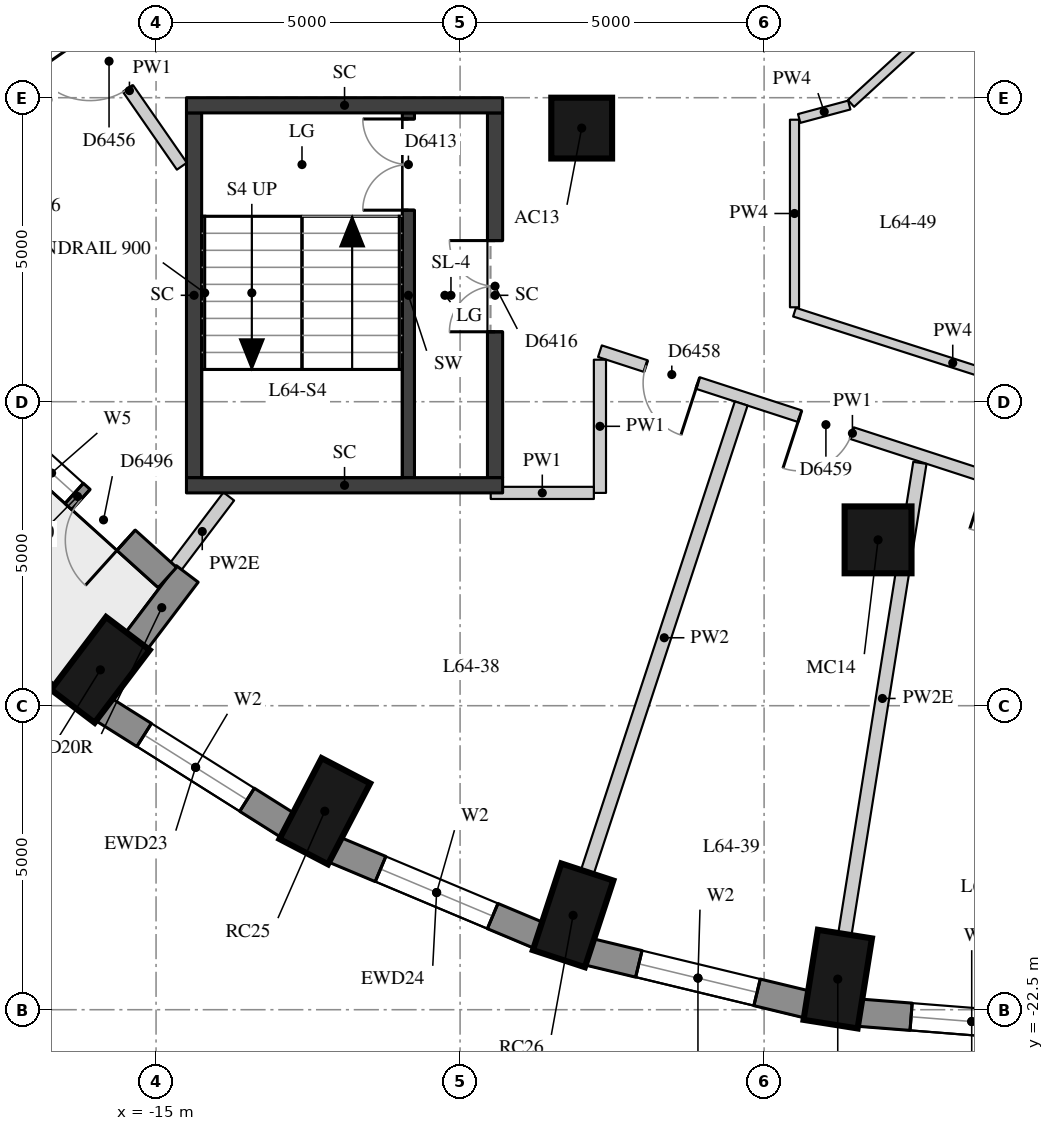
"""IFC4 building model, lengths in metres.
Left out: names, types, materials, properties, quantities, classifications, styles, units other than length and angle.
Written with IfcOpenShell. Run it as: python <this file> out.ifc"""

import sys

from ifc_helpers import new_model, si_unit, direction, frame, frame_2d, origin, origin_2d, place, context, subcontext, project, spatial, rectangle, extrude, element, fill, save


model = new_model("IFC4")
c1 = context("Model", 3, precision=1e-05, world=origin(), true_north=direction((0.0, 1.0)))
c2 = subcontext(c1, "Body", "Model", "MODEL_VIEW")
j1 = project(units=[si_unit("LENGTHUNIT", "METRE"), si_unit("PLANEANGLEUNIT", "RADIAN")], contexts=[c1])
p1 = place(None, origin())
s1 = spatial("IfcSite", under=j1, at=p1, CompositionType="ELEMENT")
p2 = place(p1, origin())
s2 = spatial("IfcBuilding", under=s1, at=p2, CompositionType="ELEMENT")
p3 = place(p2, frame((0.0, 0.0, 225.5)))
s3 = spatial("IfcBuildingStorey", under=s2, at=p3, CompositionType="ELEMENT", Elevation=225.5)
for number, where, z_axis, x_axis in (
    (1, (-15.916, -16.911, 0.0), (0.0, 0.0, 1.0), (-0.604, -0.797, 0.0)),
    (2, (-12.225, -19.235, 0.0), (0.0, 0.0, 1.0), (-0.462, -0.887, 0.0)),
    (3, (-8.141, -20.948, 0.0), (0.0, 0.0, 1.0), (-0.312, -0.95, 0.0)),
    (4, (-3.789, -21.997, 0.0), (0.0, 0.0, 1.0), (-0.157, -0.988, 0.0)),
):
    element("IfcColumn", number, at=place(p3, frame(where, z_axis=z_axis, x_axis=x_axis)), inside=s3, PredefinedType="COLUMN", context=c2, shape_type="SweptSolid", body=[
        extrude(rectangle(XDim=1.5, YDim=0.9, at=origin_2d()), origin(), (0.0, 0.0, 1.0), 3.3),
    ])
p4 = place(p3, frame((-8.0, -8.0, 0.0), z_axis=(0.0, 0.0, 1.0), x_axis=(1.0, 0.0, 0.0)))
e5 = element("IfcColumn", 5, at=p4, inside=s3, PredefinedType="COLUMN", context=c2, shape_type="SweptSolid", body=[
    extrude(rectangle(XDim=1.0, YDim=1.0, at=origin_2d()), origin(), (0.0, 0.0, 1.0), 3.3),
])
p5 = place(p3, frame((-3.126, -14.772, 0.0), z_axis=(0.0, 0.0, 1.0), x_axis=(1.0, 0.0, 0.0)))
e6 = element("IfcColumn", 6, at=p5, inside=s3, PredefinedType="COLUMN", context=c2, shape_type="SweptSolid", body=[
    extrude(rectangle(XDim=1.1, YDim=1.1, at=origin_2d()), origin(), (0.0, 0.0, 1.0), 3.3),
])
p6 = place(p3, frame((-15.867, -17.559, 0.0), z_axis=(0.0, 0.0, 1.0), x_axis=(0.84616917791, -0.532914366813, 0.0)))
e7 = element("IfcWall", 7, at=p6, inside=s3, PredefinedType="SOLIDWALL", context=c2, shape_type="SweptSolid", body=[
    extrude(rectangle(XDim=3.587, YDim=0.45, at=frame_2d((1.793, 0.0))), origin(), (0.0, 0.0, 1.0), 2.85),
])
p7 = place(p6, frame((0.793, 0.0, 0.4)))
e8 = element("IfcOpeningElement", 8, at=p7, cuts=e7, PredefinedType="OPENING", context=c2, shape_type="SweptSolid", body=[
    extrude(rectangle(XDim=2.0, YDim=1.75, at=frame_2d((1.0, 0.875))), frame((0.0, 0.235, 0.0), z_axis=(0.0, -1.0, 0.0), x_axis=(1.0, 0.0, 0.0)), (0.0, 0.0, 1.0), 0.47),
])
p8 = place(p3, frame((-12.069, -19.867, 0.0), z_axis=(0.0, 0.0, 1.0), x_axis=(0.922168222612, -0.386789050006, 0.0)))
e9 = element("IfcWall", 9, at=p8, inside=s3, PredefinedType="SOLIDWALL", context=c2, shape_type="SweptSolid", body=[
    extrude(rectangle(XDim=3.651, YDim=0.45, at=frame_2d((1.825, 0.0))), origin(), (0.0, 0.0, 1.0), 2.85),
])
p9 = place(p8, frame((0.825, 0.0, 0.4)))
e10 = element("IfcOpeningElement", 10, at=p9, cuts=e9, PredefinedType="OPENING", context=c2, shape_type="SweptSolid", body=[
    extrude(rectangle(XDim=2.0, YDim=1.75, at=frame_2d((1.0, 0.875))), frame((0.0, 0.235, 0.0), z_axis=(0.0, -1.0, 0.0), x_axis=(1.0, 0.0, 0.0)), (0.0, 0.0, 1.0), 0.47),
])
p10 = place(p3, frame((-7.885, -21.547, 0.0), z_axis=(0.0, 0.0, 1.0), x_axis=(0.9721584944, -0.234324266275, 0.0)))
e11 = element("IfcWall", 11, at=p10, inside=s3, PredefinedType="SOLIDWALL", context=c2, shape_type="SweptSolid", body=[
    extrude(rectangle(XDim=3.698, YDim=0.45, at=frame_2d((1.849, 0.0))), origin(), (0.0, 0.0, 1.0), 2.85),
])
p11 = place(p10, frame((0.849, 0.0, 0.4)))
e12 = element("IfcOpeningElement", 12, at=p11, cuts=e11, PredefinedType="OPENING", context=c2, shape_type="SweptSolid", body=[
    extrude(rectangle(XDim=2.0, YDim=1.75, at=frame_2d((1.0, 0.875))), frame((0.0, 0.235, 0.0), z_axis=(0.0, -1.0, 0.0), x_axis=(1.0, 0.0, 0.0)), (0.0, 0.0, 1.0), 0.47),
])
p12 = place(p3, frame((-3.441, -22.548, 0.0), z_axis=(0.0, 0.0, 1.0), x_axis=(0.996913971077, -0.078501810629, 0.0)))
e13 = element("IfcWall", 13, at=p12, inside=s3, PredefinedType="SOLIDWALL", context=c2, shape_type="SweptSolid", body=[
    extrude(rectangle(XDim=3.723, YDim=0.45, at=frame_2d((1.861, 0.0))), origin(), (0.0, 0.0, 1.0), 2.85),
])
p13 = place(p12, frame((0.861, 0.0, 0.4)))
e14 = element("IfcOpeningElement", 14, at=p13, cuts=e13, PredefinedType="OPENING", context=c2, shape_type="SweptSolid", body=[
    extrude(rectangle(XDim=2.0, YDim=1.75, at=frame_2d((1.0, 0.875))), frame((0.0, 0.235, 0.0), z_axis=(0.0, -1.0, 0.0), x_axis=(1.0, 0.0, 0.0)), (0.0, 0.0, 1.0), 0.47),
])
p14 = place(p3, frame((-15.326, -16.442, 0.0), z_axis=(0.0, 0.0, 1.0), x_axis=(0.603644757989, 0.797253414011, 0.0)))
e15 = element("IfcWall", 15, at=p14, inside=s3, PredefinedType="SOLIDWALL", context=c2, shape_type="SweptSolid", body=[
    extrude(rectangle(XDim=1.391, YDim=0.45, at=frame_2d((0.695, 0.0))), origin(), (0.0, 0.0, 1.0), 2.4),
])
p15 = place(p3, frame((-17.769, -12.725, 0.0), z_axis=(0.0, 0.0, 1.0), x_axis=(0.742485377568, -0.669862272484, 0.0)))
e16 = element("IfcWall", 16, at=p15, inside=s3, PredefinedType="SOLIDWALL", context=c2, shape_type="SweptSolid", body=[
    extrude(rectangle(XDim=3.98, YDim=0.45, at=frame_2d((1.99, 0.0))), origin(), (0.0, 0.0, 1.0), 2.85),
])
p16 = place(p15, frame((0.915, 0.0, 0.4)))
e17 = element("IfcOpeningElement", 17, at=p16, cuts=e16, PredefinedType="OPENING", context=c2, shape_type="SweptSolid", body=[
    extrude(rectangle(XDim=1.0, YDim=1.75, at=frame_2d((0.5, 0.875))), frame((0.0, 0.235, 0.0), z_axis=(0.0, -1.0, 0.0), x_axis=(1.0, 0.0, 0.0)), (0.0, 0.0, 1.0), 0.47),
])
p17 = place(p15, frame((2.065, 0.0, 0.0)))
e18 = element("IfcOpeningElement", 18, at=p17, cuts=e16, PredefinedType="OPENING", context=c2, shape_type="SweptSolid", body=[
    extrude(rectangle(XDim=1.0, YDim=2.15, at=frame_2d((0.5, 1.075))), frame((0.0, 0.235, 0.0), z_axis=(0.0, -1.0, 0.0), x_axis=(1.0, 0.0, 0.0)), (0.0, 0.0, 1.0), 0.47),
])
p18 = place(p3, frame((-10.85, -13.75, 0.0), z_axis=(0.0, 0.0, 1.0), x_axis=(0.0, 1.0, 0.0)))
e19 = element("IfcWall", 19, at=p18, inside=s3, PredefinedType="SHEAR", context=c2, shape_type="SweptSolid", body=[
    extrude(rectangle(XDim=6.0, YDim=0.2, at=frame_2d((3.0, 0.0))), origin(), (0.0, 0.0, 1.0), 2.85),
])
p19 = place(p18, frame((4.4, 0.0, 0.0)))
e20 = element("IfcOpeningElement", 20, at=p19, cuts=e19, PredefinedType="OPENING", context=c2, shape_type="SweptSolid", body=[
    extrude(rectangle(XDim=1.5, YDim=2.1, at=frame_2d((0.75, 1.05))), frame((0.0, 0.11, 0.0), z_axis=(0.0, -1.0, 0.0), x_axis=(1.0, 0.0, 0.0)), (0.0, 0.0, 1.0), 0.22),
])
p20 = place(p3, frame((-14.375, -13.75, -0.28), z_axis=(0.0, 0.0, 1.0), x_axis=(0.0, 1.0, 0.0)))
e21 = element("IfcWall", 21, at=p20, inside=s3, PredefinedType="SHEAR", context=c2, shape_type="SweptSolid", body=[
    extrude(rectangle(XDim=6.0, YDim=0.25, at=frame_2d((3.0, 0.0))), origin(), (0.0, 0.0, 1.0), 3.13),
])
p21 = place(p3, frame((-9.425, -13.75, -0.28), z_axis=(0.0, 0.0, 1.0), x_axis=(0.0, 1.0, 0.0)))
e22 = element("IfcWall", 22, at=p21, inside=s3, PredefinedType="SHEAR", context=c2, shape_type="SweptSolid", body=[
    extrude(rectangle(XDim=6.0, YDim=0.25, at=frame_2d((3.0, 0.0))), origin(), (0.0, 0.0, 1.0), 3.13),
])
p22 = place(p21, frame((2.4, 0.0, 0.28)))
e23 = element("IfcOpeningElement", 23, at=p22, cuts=e22, PredefinedType="OPENING", context=c2, shape_type="SweptSolid", body=[
    extrude(rectangle(XDim=1.5, YDim=2.1, at=frame_2d((0.75, 1.05))), frame((0.0, 0.135, 0.0), z_axis=(0.0, -1.0, 0.0), x_axis=(1.0, 0.0, 0.0)), (0.0, 0.0, 1.0), 0.27),
])
for number, where, z_axis, x_axis in (
    (24, (-14.5, -7.625, -0.28), (0.0, 0.0, 1.0), (1.0, 0.0, 0.0)),
    (25, (-14.5, -13.875, -0.28), (0.0, 0.0, 1.0), (1.0, 0.0, 0.0)),
):
    element("IfcWall", number, at=place(p3, frame(where, z_axis=z_axis, x_axis=x_axis)), inside=s3, PredefinedType="SHEAR", context=c2, shape_type="SweptSolid", body=[
        extrude(rectangle(XDim=5.2, YDim=0.25, at=frame_2d((2.6, 0.0))), origin(), (0.0, 0.0, 1.0), 3.13),
    ])
p23 = place(p3, frame((0.605, -14.369, 0.0), z_axis=(0.0, 0.0, 1.0), x_axis=(-0.950994614205, 0.309207444529, 0.0)))
e26 = element("IfcWall", 26, at=p23, inside=s3, PredefinedType="PARTITIONING", context=c2, shape_type="SweptSolid", body=[
    extrude(rectangle(XDim=8.733, YDim=0.2, at=frame_2d((4.366, 0.0))), origin(), (0.0, 0.0, 1.0), 2.85),
])
p24 = place(p23, frame((7.04, 0.0, 0.0)))
e27 = element("IfcOpeningElement", 27, at=p24, cuts=e26, PredefinedType="OPENING", context=c2, shape_type="SweptSolid", body=[
    extrude(rectangle(XDim=0.9, YDim=2.1, at=frame_2d((0.45, 1.05))), frame((0.0, 0.11, 0.0), z_axis=(0.0, -1.0, 0.0), x_axis=(1.0, 0.0, 0.0)), (0.0, 0.0, 1.0), 0.22),
])
p25 = place(p23, frame((4.375, 0.0, 0.0)))
e28 = element("IfcOpeningElement", 28, at=p25, cuts=e26, PredefinedType="OPENING", context=c2, shape_type="SweptSolid", body=[
    extrude(rectangle(XDim=0.9, YDim=2.1, at=frame_2d((0.45, 1.05))), frame((0.0, 0.11, 0.0), z_axis=(0.0, -1.0, 0.0), x_axis=(1.0, 0.0, 0.0)), (0.0, 0.0, 1.0), 0.22),
])
p26 = place(p23, frame((1.145, 0.0, 0.0)))
e29 = element("IfcOpeningElement", 29, at=p26, cuts=e26, PredefinedType="OPENING", context=c2, shape_type="SweptSolid", body=[
    extrude(rectangle(XDim=0.9, YDim=2.1, at=frame_2d((0.45, 1.05))), frame((0.0, 0.11, 0.0), z_axis=(0.0, -1.0, 0.0), x_axis=(1.0, 0.0, 0.0)), (0.0, 0.0, 1.0), 0.22),
])
p27 = place(p3, frame((-7.7, -11.809, 0.0), z_axis=(0.0, 0.0, 1.0), x_axis=(0.0, -1.0, 0.0)))
e30 = element("IfcWall", 30, at=p27, inside=s3, PredefinedType="PARTITIONING", context=c2, shape_type="SweptSolid", body=[
    extrude(rectangle(XDim=2.191, YDim=0.2, at=frame_2d((1.095, 0.0))), origin(), (0.0, 0.0, 1.0), 2.85),
])
p28 = place(p3, frame((-7.8, -14.0, 0.0), z_axis=(0.0, 0.0, 1.0), x_axis=(-1.0, 0.0, 0.0)))
e31 = element("IfcWall", 31, at=p28, inside=s3, PredefinedType="PARTITIONING", context=c2, shape_type="SweptSolid", body=[
    extrude(rectangle(XDim=1.696, YDim=0.2, at=frame_2d((0.848, 0.0))), origin(), (0.0, 0.0, 1.0), 2.85),
])
p29 = place(p3, frame((-14.575, -8.627, 0.0), z_axis=(0.0, 0.0, 1.0), x_axis=(-0.569910381143, 0.821706856163, 0.0)))
e32 = element("IfcWall", 32, at=p29, inside=s3, PredefinedType="PARTITIONING", context=c2, shape_type="SweptSolid", body=[
    extrude(rectangle(XDim=3.026, YDim=0.2, at=frame_2d((1.513, 0.0))), origin(), (0.0, 0.0, 1.0), 2.85),
])
p30 = place(p29, frame((1.552, 0.0, 0.0)))
e33 = element("IfcOpeningElement", 33, at=p30, cuts=e32, PredefinedType="OPENING", context=c2, shape_type="SweptSolid", body=[
    extrude(rectangle(XDim=1.1, YDim=2.1, at=frame_2d((0.55, 1.05))), frame((0.0, 0.11, 0.0), z_axis=(0.0, -1.0, 0.0), x_axis=(1.0, 0.0, 0.0)), (0.0, 0.0, 1.0), 0.22),
])
p31 = place(p3, frame((0.705, -12.7, 0.0), z_axis=(0.0, 0.0, 1.0), x_axis=(-0.952035530576, 0.305987497327, 0.0)))
e34 = element("IfcWall", 34, at=p31, inside=s3, PredefinedType="PARTITIONING", context=c2, shape_type="SweptSolid", body=[
    extrude(rectangle(XDim=5.467, YDim=0.15, at=frame_2d((2.733, 0.0))), origin(), (0.0, 0.0, 1.0), 2.85),
])
p32 = place(p3, frame((-4.5, -10.947, 0.0), z_axis=(0.0, 0.0, 1.0), x_axis=(0.0, 1.0, 0.0)))
e35 = element("IfcWall", 35, at=p32, inside=s3, PredefinedType="PARTITIONING", context=c2, shape_type="SweptSolid", body=[
    extrude(rectangle(XDim=3.085, YDim=0.15, at=frame_2d((1.542, 0.0))), origin(), (0.0, 0.0, 1.0), 2.85),
])
p33 = place(p3, frame((-4.423, -7.842, 0.0), z_axis=(0.0, 0.0, 1.0), x_axis=(0.965853333569, 0.259089440221, 0.0)))
e36 = element("IfcWall", 36, at=p33, inside=s3, PredefinedType="PARTITIONING", context=c2, shape_type="SweptSolid", body=[
    extrude(rectangle(XDim=0.852, YDim=0.15, at=frame_2d((0.426, 0.0))), origin(), (0.0, 0.0, 1.0), 2.85),
])
p34 = place(p3, frame((-3.571, -7.594, 0.0), z_axis=(0.0, 0.0, 1.0), x_axis=(0.736783660812, 0.676128565555, 0.0)))
e37 = element("IfcWall", 37, at=p34, inside=s3, PredefinedType="PARTITIONING", context=c2, shape_type="SweptSolid", body=[
    extrude(rectangle(XDim=2.709, YDim=0.15, at=frame_2d((1.354, 0.0))), origin(), (0.0, 0.0, 1.0), 2.85),
])
p35 = place(p3, frame((-14.677, -15.211, 0.0), z_axis=(0.0, 0.0, 1.0), x_axis=(0.60355868562, 0.797318576864, 0.0)))
e38 = element("IfcWall", 38, at=p35, inside=s3, PredefinedType="PARTITIONING", context=c2, shape_type="SweptSolid", body=[
    extrude(rectangle(XDim=1.447, YDim=0.22, at=frame_2d((0.723, 0.0))), origin(), (0.0, 0.0, 1.0), 2.4),
])
p36 = place(p3, frame((-7.907, -20.235, 0.0), z_axis=(0.0, 0.0, 1.0), x_axis=(0.311998426629, 0.950082618397, 0.0)))
e39 = element("IfcWall", 39, at=p36, inside=s3, PredefinedType="PARTITIONING", context=c2, shape_type="SweptSolid", body=[
    extrude(rectangle(XDim=8.111, YDim=0.22, at=frame_2d((4.055, 0.0))), origin(), (0.0, 0.0, 1.0), 2.85),
])
p37 = place(p3, frame((-3.671, -21.256, 0.0), z_axis=(0.0, 0.0, 1.0), x_axis=(0.1571047049, 0.98758195189, 0.0)))
e40 = element("IfcWall", 40, at=p37, inside=s3, PredefinedType="PARTITIONING", context=c2, shape_type="SweptSolid", body=[
    extrude(rectangle(XDim=7.848, YDim=0.22, at=frame_2d((3.924, 0.0))), origin(), (0.0, 0.0, 1.0), 2.4),
])
p38 = place(p3, frame((-16.36, -6.264, 0.0), z_axis=(0.0, 0.0, 1.0), x_axis=(-0.927381089245, -0.374118049967, 0.0)))
e41 = element("IfcWall", 41, at=p38, inside=s3, PredefinedType="PARTITIONING", context=c2, shape_type="SweptSolid", body=[
    extrude(rectangle(XDim=1.357, YDim=0.12, at=frame_2d((0.679, 0.0))), origin(), (0.0, 0.0, 1.0), 2.85),
])
p39 = place(p7, origin())
e42 = element("IfcWindow", 42, at=p39, inside=s3, PartitioningType="SINGLE_PANEL", PredefinedType="WINDOW", context=c2, shape_type="SweptSolid", body=[
    extrude(rectangle(XDim=2.0, YDim=1.75, at=frame_2d((1.0, 0.875))), frame((0.0, 0.035, 0.0), z_axis=(0.0, -1.0, 0.0), x_axis=(1.0, 0.0, 0.0)), (0.0, 0.0, 1.0), 0.06),
])
fill(e8, e42)
p40 = place(p9, origin())
e43 = element("IfcWindow", 43, at=p40, inside=s3, PartitioningType="SINGLE_PANEL", PredefinedType="WINDOW", context=c2, shape_type="SweptSolid", body=[
    extrude(rectangle(XDim=2.0, YDim=1.75, at=frame_2d((1.0, 0.875))), frame((0.0, 0.035, 0.0), z_axis=(0.0, -1.0, 0.0), x_axis=(1.0, 0.0, 0.0)), (0.0, 0.0, 1.0), 0.06),
])
fill(e10, e43)
p41 = place(p11, origin())
e44 = element("IfcWindow", 44, at=p41, inside=s3, PartitioningType="SINGLE_PANEL", PredefinedType="WINDOW", context=c2, shape_type="SweptSolid", body=[
    extrude(rectangle(XDim=2.0, YDim=1.75, at=frame_2d((1.0, 0.875))), frame((0.0, 0.035, 0.0), z_axis=(0.0, -1.0, 0.0), x_axis=(1.0, 0.0, 0.0)), (0.0, 0.0, 1.0), 0.06),
])
fill(e12, e44)
p42 = place(p13, origin())
e45 = element("IfcWindow", 45, at=p42, inside=s3, PartitioningType="SINGLE_PANEL", PredefinedType="WINDOW", context=c2, shape_type="SweptSolid", body=[
    extrude(rectangle(XDim=2.0, YDim=1.75, at=frame_2d((1.0, 0.875))), frame((0.0, 0.035, 0.0), z_axis=(0.0, -1.0, 0.0), x_axis=(1.0, 0.0, 0.0)), (0.0, 0.0, 1.0), 0.06),
])
fill(e14, e45)
p43 = place(p16, origin())
e46 = element("IfcWindow", 46, at=p43, inside=s3, PartitioningType="SINGLE_PANEL", PredefinedType="WINDOW", context=c2, shape_type="SweptSolid", body=[
    extrude(rectangle(XDim=1.0, YDim=1.75, at=frame_2d((0.5, 0.875))), frame((0.0, 0.035, 0.0), z_axis=(0.0, -1.0, 0.0), x_axis=(1.0, 0.0, 0.0)), (0.0, 0.0, 1.0), 0.06),
])
fill(e17, e46)
p44 = place(p17, frame((1.0, 0.0, 0.0), z_axis=(0.0, 0.0, 1.0), x_axis=(-1.0, 0.0, 0.0)))
e47 = element("IfcDoor", 47, at=p44, inside=s3, OperationType="SINGLE_SWING_LEFT", PredefinedType="DOOR", context=c2, shape_type="SweptSolid", body=[
    extrude(rectangle(XDim=1.0, YDim=2.15, at=frame_2d((0.5, 1.075))), frame((0.0, 0.075, 0.0), z_axis=(0.0, -1.0, 0.0), x_axis=(1.0, 0.0, 0.0)), (0.0, 0.0, 1.0), 0.05),
])
fill(e18, e47)
p45 = place(p19, origin())
e48 = element("IfcDoor", 48, at=p45, inside=s3, OperationType="DOUBLE_DOOR_SINGLE_SWING", PredefinedType="DOOR", context=c2, shape_type="SweptSolid", body=[
    extrude(rectangle(XDim=1.5, YDim=2.1, at=frame_2d((0.75, 1.05))), frame((0.0, 0.025, 0.0), z_axis=(0.0, -1.0, 0.0), x_axis=(1.0, 0.0, 0.0)), (0.0, 0.0, 1.0), 0.05),
])
fill(e20, e48)
p46 = place(p22, origin())
e49 = element("IfcDoor", 49, at=p46, inside=s3, OperationType="DOUBLE_DOOR_SINGLE_SWING", PredefinedType="DOOR", context=c2, shape_type="SweptSolid", body=[
    extrude(rectangle(XDim=1.5, YDim=2.1, at=frame_2d((0.75, 1.05))), frame((0.0, 0.025, 0.0), z_axis=(0.0, -1.0, 0.0), x_axis=(1.0, 0.0, 0.0)), (0.0, 0.0, 1.0), 0.05),
])
fill(e23, e49)
p47 = place(p30, origin())
e50 = element("IfcDoor", 50, at=p47, inside=s3, OperationType="SINGLE_SWING_RIGHT", PredefinedType="DOOR", context=c2, shape_type="SweptSolid", body=[
    extrude(rectangle(XDim=1.1, YDim=2.1, at=frame_2d((0.55, 1.05))), frame((0.0, 0.025, 0.0), z_axis=(0.0, -1.0, 0.0), x_axis=(1.0, 0.0, 0.0)), (0.0, 0.0, 1.0), 0.05),
])
fill(e33, e50)
p48 = place(p24, origin())
e51 = element("IfcDoor", 51, at=p48, inside=s3, OperationType="SINGLE_SWING_LEFT", PredefinedType="DOOR", context=c2, shape_type="SweptSolid", body=[
    extrude(rectangle(XDim=0.9, YDim=2.1, at=frame_2d((0.45, 1.05))), frame((0.0, 0.025, 0.0), z_axis=(0.0, -1.0, 0.0), x_axis=(1.0, 0.0, 0.0)), (0.0, 0.0, 1.0), 0.05),
])
fill(e27, e51)
p49 = place(p25, origin())
e52 = element("IfcDoor", 52, at=p49, inside=s3, OperationType="SINGLE_SWING_RIGHT", PredefinedType="DOOR", context=c2, shape_type="SweptSolid", body=[
    extrude(rectangle(XDim=0.9, YDim=2.1, at=frame_2d((0.45, 1.05))), frame((0.0, 0.025, 0.0), z_axis=(0.0, -1.0, 0.0), x_axis=(1.0, 0.0, 0.0)), (0.0, 0.0, 1.0), 0.05),
])
fill(e28, e52)
save(model, sys.argv[1])
